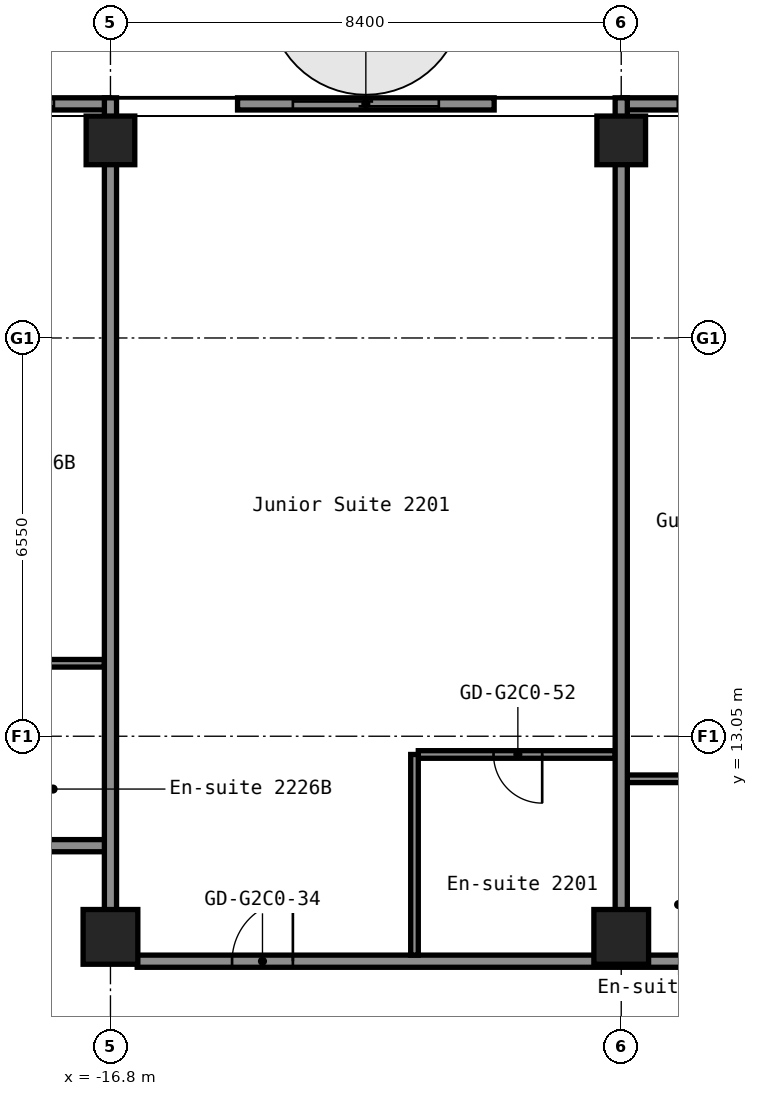
"""IFC4 building model, lengths in metres.
Left out: names, types, materials, properties, quantities, classifications, styles, units other than length and angle.
Written with IfcOpenShell. Run it as: python <this file> out.ifc"""

import sys

from ifc_helpers import new_model, si_unit, direction, frame, frame_2d, origin, origin_2d, place, context, subcontext, project, spatial, rectangle, hollow_rectangle, extrude, element, fill, save


model = new_model("IFC4")
c1 = context("Model", 3, precision=1e-05, world=origin(), true_north=direction((0.0, 1.0)))
c2 = subcontext(c1, "Body", "Model", "MODEL_VIEW")
j1 = project(units=[si_unit("LENGTHUNIT", "METRE"), si_unit("PLANEANGLEUNIT", "RADIAN")], contexts=[c1])
p1 = place(None, origin())
s1 = spatial("IfcSite", under=j1, at=p1, CompositionType="ELEMENT")
p2 = place(p1, origin())
s2 = spatial("IfcBuilding", under=s1, at=p2, CompositionType="ELEMENT")
p3 = place(p2, frame((0.0, 0.0, 81.8)))
s3 = spatial("IfcBuildingStorey", under=s2, at=p3, CompositionType="ELEMENT", Elevation=81.8)
p4 = place(p3, frame((-16.8, 9.75, 0.0), z_axis=(0.0, 0.0, 1.0), x_axis=(1.0, 0.0, 0.0)))
e1 = element("IfcColumn", 1, at=p4, inside=s3, PredefinedType="COLUMN", context=c2, shape_type="SweptSolid", body=[
    extrude(hollow_rectangle(XDim=0.9, YDim=0.9, WallThickness=0.036, at=origin_2d()), origin(), (0.0, 0.0, 1.0), 2.8),
])
p5 = place(p3, frame((-16.8, 22.85, 0.0), z_axis=(0.0, 0.0, 1.0), x_axis=(1.0, 0.0, 0.0)))
e2 = element("IfcColumn", 2, at=p5, inside=s3, PredefinedType="COLUMN", context=c2, shape_type="SweptSolid", body=[
    extrude(hollow_rectangle(XDim=0.8, YDim=0.8, WallThickness=0.032, at=origin_2d()), origin(), (0.0, 0.0, 1.0), 2.8),
])
p6 = place(p3, frame((-8.4, 9.75, 0.0), z_axis=(0.0, 0.0, 1.0), x_axis=(1.0, 0.0, 0.0)))
e3 = element("IfcColumn", 3, at=p6, inside=s3, PredefinedType="COLUMN", context=c2, shape_type="SweptSolid", body=[
    extrude(hollow_rectangle(XDim=0.9, YDim=0.9, WallThickness=0.036, at=origin_2d()), origin(), (0.0, 0.0, 1.0), 2.8),
])
p7 = place(p3, frame((-8.4, 22.85, 0.0), z_axis=(0.0, 0.0, 1.0), x_axis=(1.0, 0.0, 0.0)))
e4 = element("IfcColumn", 4, at=p7, inside=s3, PredefinedType="COLUMN", context=c2, shape_type="SweptSolid", body=[
    extrude(hollow_rectangle(XDim=0.8, YDim=0.8, WallThickness=0.032, at=origin_2d()), origin(), (0.0, 0.0, 1.0), 2.8),
])
p8 = place(p3, frame((-16.36, 9.35, 0.0), z_axis=(0.0, 0.0, 1.0), x_axis=(1.0, 0.0, 0.0)))
e5 = element("IfcWall", 5, at=p8, inside=s3, PredefinedType="PARTITIONING", context=c2, shape_type="SweptSolid", body=[
    extrude(rectangle(XDim=32.72, YDim=0.2, at=frame_2d((16.36, 0.0))), origin(), (0.0, 0.0, 1.0), 2.8),
])
p9 = place(p8, frame((1.56, 0.0, 0.0)))
e6 = element("IfcOpeningElement", 6, at=p9, cuts=e5, PredefinedType="OPENING", context=c2, shape_type="SweptSolid", body=[
    extrude(rectangle(XDim=1.0, YDim=2.1, at=frame_2d((0.5, 1.05))), frame((0.0, 0.11, 0.0), z_axis=(0.0, -1.0, 0.0), x_axis=(1.0, 0.0, 0.0)), (0.0, 0.0, 1.0), 0.22),
])
p10 = place(p8, frame((10.81, 0.0, 0.0)))
e7 = element("IfcOpeningElement", 7, at=p10, cuts=e5, PredefinedType="OPENING", context=c2, shape_type="SweptSolid", body=[
    extrude(rectangle(XDim=1.0, YDim=2.1, at=frame_2d((0.5, 1.05))), frame((0.0, 0.11, 0.0), z_axis=(0.0, -1.0, 0.0), x_axis=(1.0, 0.0, 0.0)), (0.0, 0.0, 1.0), 0.22),
])
p11 = place(p8, frame((12.51, 0.0, 0.0)))
e8 = element("IfcOpeningElement", 8, at=p11, cuts=e5, PredefinedType="OPENING", context=c2, shape_type="SweptSolid", body=[
    extrude(rectangle(XDim=1.0, YDim=2.1, at=frame_2d((0.5, 1.05))), frame((0.0, 0.11, 0.0), z_axis=(0.0, -1.0, 0.0), x_axis=(1.0, 0.0, 0.0)), (0.0, 0.0, 1.0), 0.22),
])
p12 = place(p8, frame((18.26, 0.0, 0.0)))
e9 = element("IfcOpeningElement", 9, at=p12, cuts=e5, PredefinedType="OPENING", context=c2, shape_type="SweptSolid", body=[
    extrude(rectangle(XDim=0.9, YDim=2.1, at=frame_2d((0.45, 1.05))), frame((0.0, 0.11, 0.0), z_axis=(0.0, -1.0, 0.0), x_axis=(1.0, 0.0, 0.0)), (0.0, 0.0, 1.0), 0.22),
])
p13 = place(p8, frame((22.46, 0.0, 0.0)))
e10 = element("IfcOpeningElement", 10, at=p13, cuts=e5, PredefinedType="OPENING", context=c2, shape_type="SweptSolid", body=[
    extrude(rectangle(XDim=0.9, YDim=2.1, at=frame_2d((0.45, 1.05))), frame((0.0, 0.11, 0.0), z_axis=(0.0, -1.0, 0.0), x_axis=(1.0, 0.0, 0.0)), (0.0, 0.0, 1.0), 0.22),
])
p14 = place(p8, frame((26.58, 0.0, 0.0)))
e11 = element("IfcOpeningElement", 11, at=p14, cuts=e5, PredefinedType="OPENING", context=c2, shape_type="SweptSolid", body=[
    extrude(rectangle(XDim=0.9, YDim=2.1, at=frame_2d((0.45, 1.05))), frame((0.0, 0.11, 0.0), z_axis=(0.0, -1.0, 0.0), x_axis=(1.0, 0.0, 0.0)), (0.0, 0.0, 1.0), 0.22),
])
p15 = place(p8, frame((30.78, 0.0, 0.0)))
e12 = element("IfcOpeningElement", 12, at=p15, cuts=e5, PredefinedType="OPENING", context=c2, shape_type="SweptSolid", body=[
    extrude(rectangle(XDim=0.9, YDim=2.1, at=frame_2d((0.45, 1.05))), frame((0.0, 0.11, 0.0), z_axis=(0.0, -1.0, 0.0), x_axis=(1.0, 0.0, 0.0)), (0.0, 0.0, 1.0), 0.22),
])
p16 = place(p3, frame((-46.5, 11.25, 0.0), z_axis=(0.0, 0.0, 1.0), x_axis=(1.0, 0.0, 0.0)))
e13 = element("IfcWall", 13, at=p16, inside=s3, PredefinedType="PARTITIONING", context=c2, shape_type="SweptSolid", body=[
    extrude(rectangle(XDim=29.7, YDim=0.2, at=frame_2d((14.85, 0.0))), origin(), (0.0, 0.0, 1.0), 2.8),
])
p17 = place(p16, frame((1.95, 0.0, 0.0)))
e14 = element("IfcOpeningElement", 14, at=p17, cuts=e13, PredefinedType="OPENING", context=c2, shape_type="SweptSolid", body=[
    extrude(rectangle(XDim=0.9, YDim=2.1, at=frame_2d((0.45, 1.05))), frame((0.0, 0.11, 0.0), z_axis=(0.0, -1.0, 0.0), x_axis=(1.0, 0.0, 0.0)), (0.0, 0.0, 1.0), 0.22),
])
p18 = place(p16, frame((7.35, 0.0, 0.0)))
e15 = element("IfcOpeningElement", 15, at=p18, cuts=e13, PredefinedType="OPENING", context=c2, shape_type="SweptSolid", body=[
    extrude(rectangle(XDim=1.0, YDim=2.1, at=frame_2d((0.5, 1.05))), frame((0.0, 0.11, 0.0), z_axis=(0.0, -1.0, 0.0), x_axis=(1.0, 0.0, 0.0)), (0.0, 0.0, 1.0), 0.22),
])
p19 = place(p16, frame((9.05, 0.0, 0.0)))
e16 = element("IfcOpeningElement", 16, at=p19, cuts=e13, PredefinedType="OPENING", context=c2, shape_type="SweptSolid", body=[
    extrude(rectangle(XDim=1.0, YDim=2.1, at=frame_2d((0.5, 1.05))), frame((0.0, 0.11, 0.0), z_axis=(0.0, -1.0, 0.0), x_axis=(1.0, 0.0, 0.0)), (0.0, 0.0, 1.0), 0.22),
])
p20 = place(p16, frame((18.4, 0.0, 0.0)))
e17 = element("IfcOpeningElement", 17, at=p20, cuts=e13, PredefinedType="OPENING", context=c2, shape_type="SweptSolid", body=[
    extrude(rectangle(XDim=1.0, YDim=2.1, at=frame_2d((0.5, 1.05))), frame((0.0, 0.11, 0.0), z_axis=(0.0, -1.0, 0.0), x_axis=(1.0, 0.0, 0.0)), (0.0, 0.0, 1.0), 0.22),
])
p21 = place(p16, frame((24.15, 0.0, 0.0)))
e18 = element("IfcOpeningElement", 18, at=p21, cuts=e13, PredefinedType="OPENING", context=c2, shape_type="SweptSolid", body=[
    extrude(rectangle(XDim=1.0, YDim=2.1, at=frame_2d((0.5, 1.05))), frame((0.0, 0.11, 0.0), z_axis=(0.0, -1.0, 0.0), x_axis=(1.0, 0.0, 0.0)), (0.0, 0.0, 1.0), 0.22),
])
p22 = place(p16, frame((25.85, 0.0, 0.0)))
e19 = element("IfcOpeningElement", 19, at=p22, cuts=e13, PredefinedType="OPENING", context=c2, shape_type="SweptSolid", body=[
    extrude(rectangle(XDim=1.0, YDim=2.1, at=frame_2d((0.5, 1.05))), frame((0.0, 0.11, 0.0), z_axis=(0.0, -1.0, 0.0), x_axis=(1.0, 0.0, 0.0)), (0.0, 0.0, 1.0), 0.22),
])
p23 = place(p3, frame((-8.3, 12.35, 0.0), z_axis=(0.0, 0.0, 1.0), x_axis=(1.0, 0.0, 0.0)))
e20 = element("IfcWall", 20, at=p23, inside=s3, PredefinedType="PARTITIONING", context=c2, shape_type="SweptSolid", body=[
    extrude(rectangle(XDim=2.338, YDim=0.125, at=frame_2d((1.169, 0.0))), origin(), (0.0, 0.0, 1.0), 2.8),
])
p24 = place(p3, frame((-11.738, 12.75, 0.0), z_axis=(0.0, 0.0, 1.0), x_axis=(1.0, 0.0, 0.0)))
e21 = element("IfcWall", 21, at=p24, inside=s3, PredefinedType="PARTITIONING", context=c2, shape_type="SweptSolid", body=[
    extrude(rectangle(XDim=3.238, YDim=0.125, at=frame_2d((1.619, 0.0))), origin(), (0.0, 0.0, 1.0), 2.8),
])
p25 = place(p24, frame((1.238, 0.0, 0.0)))
e22 = element("IfcOpeningElement", 22, at=p25, cuts=e21, PredefinedType="OPENING", context=c2, shape_type="SweptSolid", body=[
    extrude(rectangle(XDim=0.8, YDim=2.1, at=frame_2d((0.4, 1.05))), frame((0.0, 0.073, 0.0), z_axis=(0.0, -1.0, 0.0), x_axis=(1.0, 0.0, 0.0)), (0.0, 0.0, 1.0), 0.145),
])
p26 = place(p3, frame((-19.238, 14.25, 0.0), z_axis=(0.0, 0.0, 1.0), x_axis=(1.0, 0.0, 0.0)))
e23 = element("IfcWall", 23, at=p26, inside=s3, PredefinedType="PARTITIONING", context=c2, shape_type="SweptSolid", body=[
    extrude(rectangle(XDim=2.338, YDim=0.125, at=frame_2d((1.169, 0.0))), origin(), (0.0, 0.0, 1.0), 2.8),
])
p27 = place(p3, frame((-16.8, 10.19, 0.0), z_axis=(0.0, 0.0, 1.0), x_axis=(0.0, 1.0, 0.0)))
e24 = element("IfcWall", 24, at=p27, inside=s3, PredefinedType="PARTITIONING", context=c2, shape_type="SweptSolid", body=[
    extrude(rectangle(XDim=13.36, YDim=0.2, at=frame_2d((6.68, 0.0))), origin(), (0.0, 0.0, 1.0), 2.8),
])
p28 = place(p3, frame((-11.8, 9.45, 0.0), z_axis=(0.0, 0.0, 1.0), x_axis=(0.0, 1.0, 0.0)))
e25 = element("IfcWall", 25, at=p28, inside=s3, PredefinedType="PARTITIONING", context=c2, shape_type="SweptSolid", body=[
    extrude(rectangle(XDim=3.3, YDim=0.125, at=frame_2d((1.65, 0.0))), origin(), (0.0, 0.0, 1.0), 2.8),
])
p29 = place(p3, frame((-8.4, 10.19, 0.0), z_axis=(0.0, 0.0, 1.0), x_axis=(0.0, 1.0, 0.0)))
e26 = element("IfcWall", 26, at=p29, inside=s3, PredefinedType="PARTITIONING", context=c2, shape_type="SweptSolid", body=[
    extrude(rectangle(XDim=13.36, YDim=0.2, at=frame_2d((6.68, 0.0))), origin(), (0.0, 0.0, 1.0), 2.8),
])
p30 = place(p3, frame((-4.16, 23.45, 0.0), z_axis=(0.0, 0.0, 1.0), x_axis=(-1.0, 0.0, 0.0)))
p31 = place(p30, frame((0.91, 0.0, 0.0)))
p32 = place(p31, frame((2.4, 0.0, 0.0), z_axis=(0.0, 0.0, 1.0), x_axis=(-1.0, 0.0, 0.0)))
e27 = element("IfcDoor", 27, at=p32, inside=s3, OperationType="SLIDING_TO_LEFT", PredefinedType="DOOR", context=c2, shape_type="SweptSolid", body=[
    extrude(rectangle(XDim=2.4, YDim=2.2, at=frame_2d((1.2, 1.1))), frame((0.0, 0.025, 0.0), z_axis=(0.0, -1.0, 0.0), x_axis=(1.0, 0.0, 0.0)), (0.0, 0.0, 1.0), 0.05),
])
p33 = place(p3, frame((-10.49, 23.45, 0.0), z_axis=(0.0, 0.0, 1.0), x_axis=(-1.0, 0.0, 0.0)))
p34 = place(p33, frame((0.91, 0.0, 0.0)))
p35 = place(p34, frame((2.4, 0.0, 0.0), z_axis=(0.0, 0.0, 1.0), x_axis=(-1.0, 0.0, 0.0)))
e28 = element("IfcDoor", 28, at=p35, inside=s3, OperationType="SLIDING_TO_LEFT", PredefinedType="DOOR", context=c2, shape_type="SweptSolid", body=[
    extrude(rectangle(XDim=2.4, YDim=2.2, at=frame_2d((1.2, 1.1))), frame((0.0, 0.025, 0.0), z_axis=(0.0, -1.0, 0.0), x_axis=(1.0, 0.0, 0.0)), (0.0, 0.0, 1.0), 0.05),
])
p36 = place(p3, frame((-16.82, 23.45, 0.0), z_axis=(0.0, 0.0, 1.0), x_axis=(-1.0, 0.0, 0.0)))
p37 = place(p36, frame((0.91, 0.0, 0.0)))
p38 = place(p37, frame((2.4, 0.0, 0.0), z_axis=(0.0, 0.0, 1.0), x_axis=(-1.0, 0.0, 0.0)))
e29 = element("IfcDoor", 29, at=p38, inside=s3, OperationType="SLIDING_TO_LEFT", PredefinedType="DOOR", context=c2, shape_type="SweptSolid", body=[
    extrude(rectangle(XDim=2.4, YDim=2.2, at=frame_2d((1.2, 1.1))), frame((0.0, 0.025, 0.0), z_axis=(0.0, -1.0, 0.0), x_axis=(1.0, 0.0, 0.0)), (0.0, 0.0, 1.0), 0.05),
])
p39 = place(p9, origin())
e30 = element("IfcDoor", 30, at=p39, inside=s3, OperationType="SINGLE_SWING_LEFT", PredefinedType="DOOR", context=c2, shape_type="SweptSolid", body=[
    extrude(rectangle(XDim=1.0, YDim=2.1, at=frame_2d((0.5, 1.05))), frame((0.0, 0.025, 0.0), z_axis=(0.0, -1.0, 0.0), x_axis=(1.0, 0.0, 0.0)), (0.0, 0.0, 1.0), 0.05),
])
fill(e6, e30)
p40 = place(p25, origin())
e31 = element("IfcDoor", 31, at=p40, inside=s3, OperationType="SINGLE_SWING_RIGHT", PredefinedType="DOOR", context=c2, shape_type="SweptSolid", body=[
    extrude(rectangle(XDim=0.8, YDim=2.1, at=frame_2d((0.4, 1.05))), frame((0.0, 0.025, 0.0), z_axis=(0.0, -1.0, 0.0), x_axis=(1.0, 0.0, 0.0)), (0.0, 0.0, 1.0), 0.05),
])
fill(e22, e31)
save(model, sys.argv[1])
